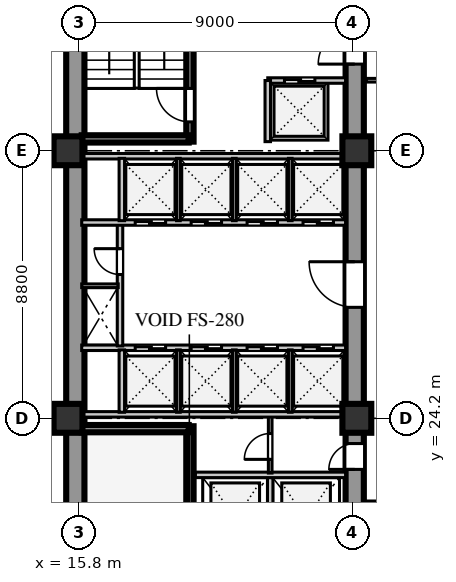
"""IFC4 building model, lengths in metres.
Left out: names, types, materials, properties, quantities, classifications, styles, units other than length and angle.
Written with IfcOpenShell. Run it as: python <this file> out.ifc"""

import sys

from ifc_helpers import new_model, si_unit, direction, frame, frame_2d, origin, origin_2d, place, context, subcontext, project, spatial, rectangle, extrude, element, fill, save


model = new_model("IFC4")
c1 = context("Model", 3, precision=1e-05, world=origin(), true_north=direction((0.0, 1.0)))
c2 = subcontext(c1, "Body", "Model", "MODEL_VIEW")
j1 = project(units=[si_unit("LENGTHUNIT", "METRE"), si_unit("PLANEANGLEUNIT", "RADIAN")], contexts=[c1])
p1 = place(None, origin())
s1 = spatial("IfcSite", under=j1, at=p1, CompositionType="ELEMENT")
p2 = place(p1, origin())
s2 = spatial("IfcBuilding", under=s1, at=p2, CompositionType="ELEMENT")
p3 = place(p2, frame((0.0, 0.0, 34.0)))
s3 = spatial("IfcBuildingStorey", under=s2, at=p3, CompositionType="ELEMENT", Elevation=34.0)
p4 = place(p3, frame((15.69, 15.81, 0.0), z_axis=(0.0, 0.0, 1.0), x_axis=(0.0, 1.0, 0.0)))
e1 = element("IfcWall", 1, at=p4, inside=s3, PredefinedType="SHEAR", context=c2, shape_type="SweptSolid", body=[
    extrude(rectangle(XDim=25.63, YDim=0.6, at=frame_2d((12.815, 0.0))), origin(), (0.0, 0.0, 1.0), 3.72),
])
p5 = place(p3, frame((24.88, 15.74, 0.0), z_axis=(0.0, 0.0, 1.0), x_axis=(0.0, 1.0, 0.0)))
e2 = element("IfcWall", 2, at=p5, inside=s3, PredefinedType="SHEAR", context=c2, shape_type="SweptSolid", body=[
    extrude(rectangle(XDim=25.76, YDim=0.6, at=frame_2d((12.88, 0.0))), origin(), (0.0, 0.0, 1.0), 3.72),
])
p6 = place(p5, frame((1.61, 0.0, 0.0)))
e3 = element("IfcOpeningElement", 3, at=p6, cuts=e2, PredefinedType="OPENING", context=c2, shape_type="SweptSolid", body=[
    extrude(rectangle(XDim=1.2, YDim=2.1, at=frame_2d((0.6, 1.05))), frame((0.0, 0.31, 0.0), z_axis=(0.0, -1.0, 0.0), x_axis=(1.0, 0.0, 0.0)), (0.0, 0.0, 1.0), 0.62),
])
p7 = place(p5, frame((6.78, 0.0, 0.0)))
e4 = element("IfcOpeningElement", 4, at=p7, cuts=e2, PredefinedType="OPENING", context=c2, shape_type="SweptSolid", body=[
    extrude(rectangle(XDim=0.85, YDim=2.06, at=frame_2d((0.425, 1.03))), frame((0.0, 0.31, 0.0), z_axis=(0.0, -1.0, 0.0), x_axis=(1.0, 0.0, 0.0)), (0.0, 0.0, 1.0), 0.62),
])
p8 = place(p5, frame((12.11, 0.0, 0.0)))
e5 = element("IfcOpeningElement", 5, at=p8, cuts=e2, PredefinedType="OPENING", context=c2, shape_type="SweptSolid", body=[
    extrude(rectangle(XDim=1.5, YDim=2.12, at=frame_2d((0.75, 1.06))), frame((0.0, 0.31, 0.0), z_axis=(0.0, -1.0, 0.0), x_axis=(1.0, 0.0, 0.0)), (0.0, 0.0, 1.0), 0.62),
])
p9 = place(p5, frame((20.11, 0.0, 0.0)))
e6 = element("IfcOpeningElement", 6, at=p9, cuts=e2, PredefinedType="OPENING", context=c2, shape_type="SweptSolid", body=[
    extrude(rectangle(XDim=1.2, YDim=2.12, at=frame_2d((0.6, 1.06))), frame((0.0, 0.31, 0.0), z_axis=(0.0, -1.0, 0.0), x_axis=(1.0, 0.0, 0.0)), (0.0, 0.0, 1.0), 0.62),
])
p10 = place(p5, frame((24.01, 0.0, 0.0)))
e7 = element("IfcOpeningElement", 7, at=p10, cuts=e2, PredefinedType="OPENING", context=c2, shape_type="SweptSolid", body=[
    extrude(rectangle(XDim=0.95, YDim=2.1, at=frame_2d((0.475, 1.05))), frame((0.0, 0.31, 0.0), z_axis=(0.0, -1.0, 0.0), x_axis=(1.0, 0.0, 0.0)), (0.0, 0.0, 1.0), 0.62),
])
for number, where, z_axis, x_axis in (
    (8, (15.45, 24.2, 0.0), (0.0, 0.0, 1.0), (1.0, 0.0, 0.0)),
    (9, (15.45, 33.0, 0.0), (0.0, 0.0, 1.0), (1.0, 0.0, 0.0)),
    (10, (24.95, 24.2, 0.0), (0.0, 0.0, 1.0), (1.0, 0.0, 0.0)),
    (11, (24.95, 33.0, 0.0), (0.0, 0.0, 1.0), (1.0, 0.0, 0.0)),
):
    element("IfcColumn", number, at=place(p3, frame(where, z_axis=z_axis, x_axis=x_axis)), inside=s3, PredefinedType="COLUMN", context=c2, shape_type="SweptSolid", body=[
        extrude(rectangle(XDim=0.95, YDim=0.95, at=origin_2d()), origin(), (0.0, 0.0, 1.0), 3.72),
    ])
p11 = place(p3, frame((19.46, 15.74, 0.0), z_axis=(0.0, 0.0, 1.0), x_axis=(0.0, 1.0, 0.0)))
e12 = element("IfcWall", 12, at=p11, inside=s3, PredefinedType="SHEAR", context=c2, shape_type="SweptSolid", body=[
    extrude(rectangle(XDim=8.2, YDim=0.24, at=frame_2d((4.1, 0.0))), origin(), (0.0, 0.0, 1.0), 4.0),
])
p12 = place(p11, frame((0.45, 0.0, 0.0)))
e13 = element("IfcOpeningElement", 13, at=p12, cuts=e12, PredefinedType="OPENING", context=c2, shape_type="SweptSolid", body=[
    extrude(rectangle(XDim=1.1, YDim=2.1, at=frame_2d((0.55, 1.05))), frame((0.0, 0.13, 0.0), z_axis=(0.0, -1.0, 0.0), x_axis=(1.0, 0.0, 0.0)), (0.0, 0.0, 1.0), 0.26),
])
p13 = place(p3, frame((15.9, 23.86, 0.0), z_axis=(0.0, 0.0, 1.0), x_axis=(1.0, 0.0, 0.0)))
e14 = element("IfcWall", 14, at=p13, inside=s3, PredefinedType="SHEAR", context=c2, shape_type="SweptSolid", body=[
    extrude(rectangle(XDim=3.52, YDim=0.24, at=frame_2d((1.76, 0.0))), origin(), (0.0, 0.0, 1.0), 4.0),
])
p14 = place(p3, frame((22.1, 19.51, 0.0), z_axis=(0.0, 0.0, 1.0), x_axis=(0.0, 1.0, 0.0)))
e15 = element("IfcWall", 15, at=p14, inside=s3, PredefinedType="SOLIDWALL", context=c2, shape_type="SweptSolid", body=[
    extrude(rectangle(XDim=2.74, YDim=0.18, at=frame_2d((1.37, 0.0))), origin(), (0.0, 0.0, 1.0), 3.72),
])
p15 = place(p3, frame((19.64, 22.34, 0.0), z_axis=(0.0, 0.0, 1.0), x_axis=(1.0, 0.0, 0.0)))
e16 = element("IfcWall", 16, at=p15, inside=s3, PredefinedType="SOLIDWALL", context=c2, shape_type="SweptSolid", body=[
    extrude(rectangle(XDim=4.94, YDim=0.18, at=frame_2d((2.47, 0.0))), origin(), (0.0, 0.0, 1.0), 3.72),
])
p16 = place(p3, frame((22.1, 22.4, 0.0), z_axis=(0.0, 0.0, 1.0), x_axis=(0.0, 1.0, 0.0)))
e17 = element("IfcWall", 17, at=p16, inside=s3, PredefinedType="PARTITIONING", context=c2, shape_type="SweptSolid", body=[
    extrude(rectangle(XDim=1.88, YDim=0.12, at=frame_2d((0.94, 0.0))), origin(), (0.0, 0.0, 1.0), 3.72),
])
p17 = place(p16, frame((0.45, 0.0, 0.0)))
e18 = element("IfcOpeningElement", 18, at=p17, cuts=e17, PredefinedType="OPENING", context=c2, shape_type="SweptSolid", body=[
    extrude(rectangle(XDim=0.85, YDim=2.06, at=frame_2d((0.425, 1.03))), frame((0.0, 0.07, 0.0), z_axis=(0.0, -1.0, 0.0), x_axis=(1.0, 0.0, 0.0)), (0.0, 0.0, 1.0), 0.14),
])
p18 = place(p3, frame((15.9, 26.52, 0.0), z_axis=(0.0, 0.0, 1.0), x_axis=(1.0, 0.0, 0.0)))
e19 = element("IfcWall", 19, at=p18, inside=s3, PredefinedType="SOLIDWALL", context=c2, shape_type="SweptSolid", body=[
    extrude(rectangle(XDim=8.68, YDim=0.18, at=frame_2d((4.34, 0.0))), origin(), (0.0, 0.0, 1.0), 3.72),
])
p19 = place(p18, frame((1.76, 0.0, 0.0)))
e20 = element("IfcOpeningElement", 20, at=p19, cuts=e19, PredefinedType="OPENING", context=c2, shape_type="SweptSolid", body=[
    extrude(rectangle(XDim=1.0, YDim=2.1, at=frame_2d((0.5, 1.05))), frame((0.0, 0.1, 0.0), z_axis=(0.0, -1.0, 0.0), x_axis=(1.0, 0.0, 0.0)), (0.0, 0.0, 1.0), 0.2),
])
p20 = place(p18, frame((3.6, 0.0, 0.0)))
e21 = element("IfcOpeningElement", 21, at=p20, cuts=e19, PredefinedType="OPENING", context=c2, shape_type="SweptSolid", body=[
    extrude(rectangle(XDim=1.0, YDim=2.1, at=frame_2d((0.5, 1.05))), frame((0.0, 0.1, 0.0), z_axis=(0.0, -1.0, 0.0), x_axis=(1.0, 0.0, 0.0)), (0.0, 0.0, 1.0), 0.2),
])
p21 = place(p18, frame((5.44, 0.0, 0.0)))
e22 = element("IfcOpeningElement", 22, at=p21, cuts=e19, PredefinedType="OPENING", context=c2, shape_type="SweptSolid", body=[
    extrude(rectangle(XDim=1.0, YDim=2.1, at=frame_2d((0.5, 1.05))), frame((0.0, 0.1, 0.0), z_axis=(0.0, -1.0, 0.0), x_axis=(1.0, 0.0, 0.0)), (0.0, 0.0, 1.0), 0.2),
])
p22 = place(p18, frame((7.28, 0.0, 0.0)))
e23 = element("IfcOpeningElement", 23, at=p22, cuts=e19, PredefinedType="OPENING", context=c2, shape_type="SweptSolid", body=[
    extrude(rectangle(XDim=1.0, YDim=2.1, at=frame_2d((0.5, 1.05))), frame((0.0, 0.1, 0.0), z_axis=(0.0, -1.0, 0.0), x_axis=(1.0, 0.0, 0.0)), (0.0, 0.0, 1.0), 0.2),
])
p23 = place(p3, frame((15.9, 24.33, 0.0), z_axis=(0.0, 0.0, 1.0), x_axis=(1.0, 0.0, 0.0)))
e24 = element("IfcWall", 24, at=p23, inside=s3, PredefinedType="SOLIDWALL", context=c2, shape_type="SweptSolid", body=[
    extrude(rectangle(XDim=8.68, YDim=0.18, at=frame_2d((4.34, 0.0))), origin(), (0.0, 0.0, 1.0), 3.02),
])
p24 = place(p3, frame((17.22, 24.4, 0.0), z_axis=(0.0, 0.0, 1.0), x_axis=(0.0, 1.0, 0.0)))
e25 = element("IfcWall", 25, at=p24, inside=s3, PredefinedType="SOLIDWALL", context=c2, shape_type="SweptSolid", body=[
    extrude(rectangle(XDim=2.05, YDim=0.18, at=frame_2d((1.025, 0.0))), origin(), (0.0, 0.0, 1.0), 3.72),
])
for number, where, z_axis, x_axis in (
    (26, (19.08, 24.4, 0.0), (0.0, 0.0, 1.0), (0.0, 1.0, 0.0)),
    (27, (20.92, 24.4, 0.0), (0.0, 0.0, 1.0), (0.0, 1.0, 0.0)),
    (28, (22.76, 24.4, 0.0), (0.0, 0.0, 1.0), (0.0, 1.0, 0.0)),
):
    element("IfcWall", number, at=place(p3, frame(where, z_axis=z_axis, x_axis=x_axis)), inside=s3, PredefinedType="PARTITIONING", context=c2, shape_type="SweptSolid", body=[
        extrude(rectangle(XDim=2.05, YDim=0.12, at=frame_2d((1.025, 0.0))), origin(), (0.0, 0.0, 1.0), 3.72),
    ])
p25 = place(p3, frame((17.16, 26.58, 0.0), z_axis=(0.0, 0.0, 1.0), x_axis=(0.0, 1.0, 0.0)))
e29 = element("IfcWall", 29, at=p25, inside=s3, PredefinedType="SOLIDWALL", context=c2, shape_type="SweptSolid", body=[
    extrude(rectangle(XDim=4.02, YDim=0.18, at=frame_2d((2.01, 0.0))), origin(), (0.0, 0.0, 1.0), 3.72),
])
p26 = place(p25, frame((2.35, 0.0, 0.0)))
e30 = element("IfcOpeningElement", 30, at=p26, cuts=e29, PredefinedType="OPENING", context=c2, shape_type="SweptSolid", body=[
    extrude(rectangle(XDim=0.85, YDim=2.06, at=frame_2d((0.425, 1.03))), frame((0.0, 0.1, 0.0), z_axis=(0.0, -1.0, 0.0), x_axis=(1.0, 0.0, 0.0)), (0.0, 0.0, 1.0), 0.2),
])
p27 = place(p3, frame((15.9, 28.56, 0.0), z_axis=(0.0, 0.0, 1.0), x_axis=(1.0, 0.0, 0.0)))
e31 = element("IfcWall", 31, at=p27, inside=s3, PredefinedType="PARTITIONING", context=c2, shape_type="SweptSolid", body=[
    extrude(rectangle(XDim=1.2, YDim=0.12, at=frame_2d((0.6, 0.0))), origin(), (0.0, 0.0, 1.0), 3.72),
])
p28 = place(p3, frame((15.9, 30.64, 0.0), z_axis=(0.0, 0.0, 1.0), x_axis=(1.0, 0.0, 0.0)))
e32 = element("IfcWall", 32, at=p28, inside=s3, PredefinedType="SOLIDWALL", context=c2, shape_type="SweptSolid", body=[
    extrude(rectangle(XDim=8.68, YDim=0.18, at=frame_2d((4.34, 0.0))), origin(), (0.0, 0.0, 1.0), 3.72),
])
p29 = place(p28, frame((1.76, 0.0, 0.0)))
e33 = element("IfcOpeningElement", 33, at=p29, cuts=e32, PredefinedType="OPENING", context=c2, shape_type="SweptSolid", body=[
    extrude(rectangle(XDim=1.0, YDim=2.1, at=frame_2d((0.5, 1.05))), frame((0.0, 0.1, 0.0), z_axis=(0.0, -1.0, 0.0), x_axis=(1.0, 0.0, 0.0)), (0.0, 0.0, 1.0), 0.2),
])
p30 = place(p28, frame((3.6, 0.0, 0.0)))
e34 = element("IfcOpeningElement", 34, at=p30, cuts=e32, PredefinedType="OPENING", context=c2, shape_type="SweptSolid", body=[
    extrude(rectangle(XDim=1.0, YDim=2.1, at=frame_2d((0.5, 1.05))), frame((0.0, 0.1, 0.0), z_axis=(0.0, -1.0, 0.0), x_axis=(1.0, 0.0, 0.0)), (0.0, 0.0, 1.0), 0.2),
])
p31 = place(p28, frame((5.44, 0.0, 0.0)))
e35 = element("IfcOpeningElement", 35, at=p31, cuts=e32, PredefinedType="OPENING", context=c2, shape_type="SweptSolid", body=[
    extrude(rectangle(XDim=1.0, YDim=2.1, at=frame_2d((0.5, 1.05))), frame((0.0, 0.1, 0.0), z_axis=(0.0, -1.0, 0.0), x_axis=(1.0, 0.0, 0.0)), (0.0, 0.0, 1.0), 0.2),
])
p32 = place(p28, frame((7.28, 0.0, 0.0)))
e36 = element("IfcOpeningElement", 36, at=p32, cuts=e32, PredefinedType="OPENING", context=c2, shape_type="SweptSolid", body=[
    extrude(rectangle(XDim=1.0, YDim=2.1, at=frame_2d((0.5, 1.05))), frame((0.0, 0.1, 0.0), z_axis=(0.0, -1.0, 0.0), x_axis=(1.0, 0.0, 0.0)), (0.0, 0.0, 1.0), 0.2),
])
p33 = place(p3, frame((15.9, 32.82, 0.0), z_axis=(0.0, 0.0, 1.0), x_axis=(1.0, 0.0, 0.0)))
e37 = element("IfcWall", 37, at=p33, inside=s3, PredefinedType="SOLIDWALL", context=c2, shape_type="SweptSolid", body=[
    extrude(rectangle(XDim=8.68, YDim=0.18, at=frame_2d((4.34, 0.0))), origin(), (0.0, 0.0, 1.0), 3.02),
])
p34 = place(p3, frame((17.22, 30.7, 0.0), z_axis=(0.0, 0.0, 1.0), x_axis=(0.0, 1.0, 0.0)))
e38 = element("IfcWall", 38, at=p34, inside=s3, PredefinedType="SOLIDWALL", context=c2, shape_type="SweptSolid", body=[
    extrude(rectangle(XDim=2.05, YDim=0.18, at=frame_2d((1.025, 0.0))), origin(), (0.0, 0.0, 1.0), 3.72),
])
for number, where, z_axis, x_axis in (
    (39, (19.08, 30.7, 0.0), (0.0, 0.0, 1.0), (0.0, 1.0, 0.0)),
    (40, (20.92, 30.7, 0.0), (0.0, 0.0, 1.0), (0.0, 1.0, 0.0)),
    (41, (22.76, 30.7, 0.0), (0.0, 0.0, 1.0), (0.0, 1.0, 0.0)),
):
    element("IfcWall", number, at=place(p3, frame(where, z_axis=z_axis, x_axis=x_axis)), inside=s3, PredefinedType="PARTITIONING", context=c2, shape_type="SweptSolid", body=[
        extrude(rectangle(XDim=2.05, YDim=0.12, at=frame_2d((1.025, 0.0))), origin(), (0.0, 0.0, 1.0), 3.72),
    ])
p35 = place(p3, frame((19.46, 33.3, 0.0), z_axis=(0.0, 0.0, 1.0), x_axis=(0.0, 1.0, 0.0)))
e42 = element("IfcWall", 42, at=p35, inside=s3, PredefinedType="SHEAR", context=c2, shape_type="SweptSolid", body=[
    extrude(rectangle(XDim=8.18, YDim=0.24, at=frame_2d((4.09, 0.0))), origin(), (0.0, 0.0, 1.0), 4.0),
])
p36 = place(p35, frame((0.65, 0.0, 0.0)))
e43 = element("IfcOpeningElement", 43, at=p36, cuts=e42, PredefinedType="OPENING", context=c2, shape_type="SweptSolid", body=[
    extrude(rectangle(XDim=1.1, YDim=2.1, at=frame_2d((0.55, 1.05))), frame((0.0, 0.13, 0.0), z_axis=(0.0, -1.0, 0.0), x_axis=(1.0, 0.0, 0.0)), (0.0, 0.0, 1.0), 0.26),
])
p37 = place(p3, frame((15.9, 33.39, 0.0), z_axis=(0.0, 0.0, 1.0), x_axis=(1.0, 0.0, 0.0)))
e44 = element("IfcWall", 44, at=p37, inside=s3, PredefinedType="SHEAR", context=c2, shape_type="SweptSolid", body=[
    extrude(rectangle(XDim=3.52, YDim=0.24, at=frame_2d((1.76, 0.0))), origin(), (0.0, 0.0, 1.0), 4.0),
])
p38 = place(p3, frame((22.02, 35.31, 0.0), z_axis=(0.0, 0.0, 1.0), x_axis=(1.0, 0.0, 0.0)))
e45 = element("IfcWall", 45, at=p38, inside=s3, PredefinedType="SOLIDWALL", context=c2, shape_type="SweptSolid", body=[
    extrude(rectangle(XDim=2.56, YDim=0.18, at=frame_2d((1.28, 0.0))), origin(), (0.0, 0.0, 1.0), 3.72),
])
p39 = place(p38, frame((0.55, 0.0, 0.0)))
e46 = element("IfcOpeningElement", 46, at=p39, cuts=e45, PredefinedType="OPENING", context=c2, shape_type="SweptSolid", body=[
    extrude(rectangle(XDim=1.0, YDim=2.1, at=frame_2d((0.5, 1.05))), frame((0.0, 0.1, 0.0), z_axis=(0.0, -1.0, 0.0), x_axis=(1.0, 0.0, 0.0)), (0.0, 0.0, 1.0), 0.2),
])
p40 = place(p3, frame((22.02, 33.3, 0.0), z_axis=(0.0, 0.0, 1.0), x_axis=(0.0, 1.0, 0.0)))
e47 = element("IfcWall", 47, at=p40, inside=s3, PredefinedType="SOLIDWALL", context=c2, shape_type="SweptSolid", body=[
    extrude(rectangle(XDim=2.01, YDim=0.18, at=frame_2d((1.005, 0.0))), origin(), (0.0, 0.0, 1.0), 3.72),
])
p41 = place(p3, frame((25.25, 21.42, 0.0), z_axis=(0.0, 0.0, 1.0), x_axis=(1.0, 0.0, 0.0)))
e48 = element("IfcWall", 48, at=p41, inside=s3, PredefinedType="PARTITIONING", context=c2, shape_type="SweptSolid", body=[
    extrude(rectangle(XDim=12.87, YDim=0.12, at=frame_2d((6.435, 0.0))), origin(), (0.0, 0.0, 1.0), 3.32),
])
p42 = place(p41, frame((5.945, 0.0, 0.0)))
e49 = element("IfcOpeningElement", 49, at=p42, cuts=e48, PredefinedType="OPENING", context=c2, shape_type="SweptSolid", body=[
    extrude(rectangle(XDim=0.95, YDim=2.08, at=frame_2d((0.475, 1.04))), frame((0.0, 0.07, 0.0), z_axis=(0.0, -1.0, 0.0), x_axis=(1.0, 0.0, 0.0)), (0.0, 0.0, 1.0), 0.14),
])
p43 = place(p3, frame((25.25, 35.32, 0.0), z_axis=(0.0, 0.0, 1.0), x_axis=(1.0, 0.0, 0.0)))
e50 = element("IfcWall", 50, at=p43, inside=s3, PredefinedType="PARTITIONING", context=c2, shape_type="SweptSolid", body=[
    extrude(rectangle(XDim=9.47, YDim=0.12, at=frame_2d((4.735, 0.0))), origin(), (0.0, 0.0, 1.0), 3.72),
])
p44 = place(p43, frame((4.265, 0.0, 0.0)))
e51 = element("IfcOpeningElement", 51, at=p44, cuts=e50, PredefinedType="OPENING", context=c2, shape_type="SweptSolid", body=[
    extrude(rectangle(XDim=0.95, YDim=2.08, at=frame_2d((0.475, 1.04))), frame((0.0, 0.07, 0.0), z_axis=(0.0, -1.0, 0.0), x_axis=(1.0, 0.0, 0.0)), (0.0, 0.0, 1.0), 0.14),
])
p45 = place(p17, origin())
e52 = element("IfcDoor", 52, at=p45, inside=s3, OperationType="SINGLE_SWING_LEFT", PredefinedType="DOOR", context=c2, shape_type="SweptSolid", body=[
    extrude(rectangle(XDim=0.85, YDim=2.06, at=frame_2d((0.425, 1.03))), frame((0.0, 0.025, 0.0), z_axis=(0.0, -1.0, 0.0), x_axis=(1.0, 0.0, 0.0)), (0.0, 0.0, 1.0), 0.05),
])
fill(e18, e52)
p46 = place(p7, frame((0.85, 0.0, 0.0), z_axis=(0.0, 0.0, 1.0), x_axis=(-1.0, 0.0, 0.0)))
e53 = element("IfcDoor", 53, at=p46, inside=s3, OperationType="SINGLE_SWING_RIGHT", PredefinedType="DOOR", context=c2, shape_type="SweptSolid", body=[
    extrude(rectangle(XDim=0.85, YDim=2.06, at=frame_2d((0.425, 1.03))), frame((0.0, 0.025, 0.0), z_axis=(0.0, -1.0, 0.0), x_axis=(1.0, 0.0, 0.0)), (0.0, 0.0, 1.0), 0.05),
])
fill(e4, e53)
p47 = place(p19, origin())
e54 = element("IfcDoor", 54, at=p47, inside=s3, OperationType="DOUBLE_DOOR_SLIDING", PredefinedType="DOOR", context=c2, shape_type="SweptSolid", body=[
    extrude(rectangle(XDim=1.0, YDim=2.1, at=frame_2d((0.5, 1.05))), frame((0.0, 0.025, 0.0), z_axis=(0.0, -1.0, 0.0), x_axis=(1.0, 0.0, 0.0)), (0.0, 0.0, 1.0), 0.05),
])
fill(e20, e54)
p48 = place(p20, origin())
e55 = element("IfcDoor", 55, at=p48, inside=s3, OperationType="DOUBLE_DOOR_SLIDING", PredefinedType="DOOR", context=c2, shape_type="SweptSolid", body=[
    extrude(rectangle(XDim=1.0, YDim=2.1, at=frame_2d((0.5, 1.05))), frame((0.0, 0.025, 0.0), z_axis=(0.0, -1.0, 0.0), x_axis=(1.0, 0.0, 0.0)), (0.0, 0.0, 1.0), 0.05),
])
fill(e21, e55)
p49 = place(p21, origin())
e56 = element("IfcDoor", 56, at=p49, inside=s3, OperationType="DOUBLE_DOOR_SLIDING", PredefinedType="DOOR", context=c2, shape_type="SweptSolid", body=[
    extrude(rectangle(XDim=1.0, YDim=2.1, at=frame_2d((0.5, 1.05))), frame((0.0, 0.025, 0.0), z_axis=(0.0, -1.0, 0.0), x_axis=(1.0, 0.0, 0.0)), (0.0, 0.0, 1.0), 0.05),
])
fill(e22, e56)
p50 = place(p22, origin())
e57 = element("IfcDoor", 57, at=p50, inside=s3, OperationType="DOUBLE_DOOR_SLIDING", PredefinedType="DOOR", context=c2, shape_type="SweptSolid", body=[
    extrude(rectangle(XDim=1.0, YDim=2.1, at=frame_2d((0.5, 1.05))), frame((0.0, 0.025, 0.0), z_axis=(0.0, -1.0, 0.0), x_axis=(1.0, 0.0, 0.0)), (0.0, 0.0, 1.0), 0.05),
])
fill(e23, e57)
p51 = place(p26, origin())
e58 = element("IfcDoor", 58, at=p51, inside=s3, OperationType="SINGLE_SWING_RIGHT", PredefinedType="DOOR", context=c2, shape_type="SweptSolid", body=[
    extrude(rectangle(XDim=0.85, YDim=2.06, at=frame_2d((0.425, 1.03))), frame((0.0, 0.025, 0.0), z_axis=(0.0, -1.0, 0.0), x_axis=(1.0, 0.0, 0.0)), (0.0, 0.0, 1.0), 0.05),
])
fill(e30, e58)
p52 = place(p8, frame((1.5, 0.0, 0.0), z_axis=(0.0, 0.0, 1.0), x_axis=(-1.0, 0.0, 0.0)))
e59 = element("IfcDoor", 59, at=p52, inside=s3, OperationType="SINGLE_SWING_LEFT", PredefinedType="DOOR", context=c2, shape_type="SweptSolid", body=[
    extrude(rectangle(XDim=1.5, YDim=2.12, at=frame_2d((0.75, 1.06))), frame((0.0, 0.025, 0.0), z_axis=(0.0, -1.0, 0.0), x_axis=(1.0, 0.0, 0.0)), (0.0, 0.0, 1.0), 0.05),
])
fill(e5, e59)
p53 = place(p29, frame((1.0, 0.0, 0.0), z_axis=(0.0, 0.0, 1.0), x_axis=(-1.0, 0.0, 0.0)))
e60 = element("IfcDoor", 60, at=p53, inside=s3, OperationType="DOUBLE_DOOR_SLIDING", PredefinedType="DOOR", context=c2, shape_type="SweptSolid", body=[
    extrude(rectangle(XDim=1.0, YDim=2.1, at=frame_2d((0.5, 1.05))), frame((0.0, 0.025, 0.0), z_axis=(0.0, -1.0, 0.0), x_axis=(1.0, 0.0, 0.0)), (0.0, 0.0, 1.0), 0.05),
])
fill(e33, e60)
p54 = place(p30, frame((1.0, 0.0, 0.0), z_axis=(0.0, 0.0, 1.0), x_axis=(-1.0, 0.0, 0.0)))
e61 = element("IfcDoor", 61, at=p54, inside=s3, OperationType="DOUBLE_DOOR_SLIDING", PredefinedType="DOOR", context=c2, shape_type="SweptSolid", body=[
    extrude(rectangle(XDim=1.0, YDim=2.1, at=frame_2d((0.5, 1.05))), frame((0.0, 0.025, 0.0), z_axis=(0.0, -1.0, 0.0), x_axis=(1.0, 0.0, 0.0)), (0.0, 0.0, 1.0), 0.05),
])
fill(e34, e61)
p55 = place(p31, frame((1.0, 0.0, 0.0), z_axis=(0.0, 0.0, 1.0), x_axis=(-1.0, 0.0, 0.0)))
e62 = element("IfcDoor", 62, at=p55, inside=s3, OperationType="DOUBLE_DOOR_SLIDING", PredefinedType="DOOR", context=c2, shape_type="SweptSolid", body=[
    extrude(rectangle(XDim=1.0, YDim=2.1, at=frame_2d((0.5, 1.05))), frame((0.0, 0.025, 0.0), z_axis=(0.0, -1.0, 0.0), x_axis=(1.0, 0.0, 0.0)), (0.0, 0.0, 1.0), 0.05),
])
fill(e35, e62)
p56 = place(p32, frame((1.0, 0.0, 0.0), z_axis=(0.0, 0.0, 1.0), x_axis=(-1.0, 0.0, 0.0)))
e63 = element("IfcDoor", 63, at=p56, inside=s3, OperationType="DOUBLE_DOOR_SLIDING", PredefinedType="DOOR", context=c2, shape_type="SweptSolid", body=[
    extrude(rectangle(XDim=1.0, YDim=2.1, at=frame_2d((0.5, 1.05))), frame((0.0, 0.025, 0.0), z_axis=(0.0, -1.0, 0.0), x_axis=(1.0, 0.0, 0.0)), (0.0, 0.0, 1.0), 0.05),
])
fill(e36, e63)
p57 = place(p36, origin())
e64 = element("IfcDoor", 64, at=p57, inside=s3, OperationType="SINGLE_SWING_RIGHT", PredefinedType="DOOR", context=c2, shape_type="SweptSolid", body=[
    extrude(rectangle(XDim=1.1, YDim=2.1, at=frame_2d((0.55, 1.05))), frame((0.0, 0.025, 0.0), z_axis=(0.0, -1.0, 0.0), x_axis=(1.0, 0.0, 0.0)), (0.0, 0.0, 1.0), 0.05),
])
fill(e43, e64)
p58 = place(p9, frame((1.2, 0.0, 0.0), z_axis=(0.0, 0.0, 1.0), x_axis=(-1.0, 0.0, 0.0)))
e65 = element("IfcDoor", 65, at=p58, inside=s3, OperationType="SINGLE_SWING_RIGHT", PredefinedType="DOOR", context=c2, shape_type="SweptSolid", body=[
    extrude(rectangle(XDim=1.2, YDim=2.12, at=frame_2d((0.6, 1.06))), frame((0.0, 0.025, 0.0), z_axis=(0.0, -1.0, 0.0), x_axis=(1.0, 0.0, 0.0)), (0.0, 0.0, 1.0), 0.05),
])
fill(e6, e65)
p59 = place(p39, origin())
e66 = element("IfcDoor", 66, at=p59, inside=s3, OperationType="DOUBLE_DOOR_SLIDING", PredefinedType="DOOR", context=c2, shape_type="SweptSolid", body=[
    extrude(rectangle(XDim=1.0, YDim=2.1, at=frame_2d((0.5, 1.05))), frame((0.0, 0.025, 0.0), z_axis=(0.0, -1.0, 0.0), x_axis=(1.0, 0.0, 0.0)), (0.0, 0.0, 1.0), 0.05),
])
fill(e46, e66)
save(model, sys.argv[1])
